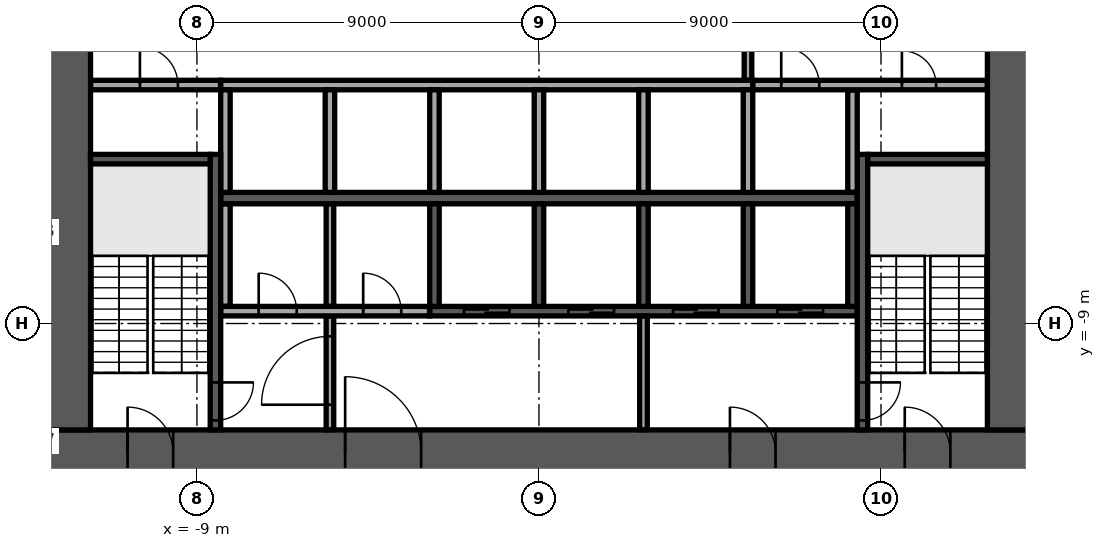
"""IFC4 building model, lengths in metres.
Left out: names, types, materials, properties, quantities, classifications, styles, units other than length and angle.
Written with IfcOpenShell. Run it as: python <this file> out.ifc"""

import sys

from ifc_helpers import new_model, si_unit, direction, frame, frame_2d, origin, place, context, subcontext, project, spatial, rectangle, extrude, element, fill, save


model = new_model("IFC4")
c1 = context("Model", 3, precision=1e-05, world=origin(), true_north=direction((0.0, 1.0)))
c2 = subcontext(c1, "Body", "Model", "MODEL_VIEW")
j1 = project(units=[si_unit("LENGTHUNIT", "METRE"), si_unit("PLANEANGLEUNIT", "RADIAN")], contexts=[c1])
p1 = place(None, origin())
s1 = spatial("IfcSite", under=j1, at=p1, CompositionType="ELEMENT")
p2 = place(p1, origin())
s2 = spatial("IfcBuilding", under=s1, at=p2, CompositionType="ELEMENT")
p3 = place(p2, frame((0.0, 0.0, 59.7)))
s3 = spatial("IfcBuildingStorey", under=s2, at=p3, CompositionType="ELEMENT", Elevation=59.7)
p4 = place(p3, frame((-13.0, -12.4, 0.0), z_axis=(0.0, 0.0, 1.0), x_axis=(1.0, 0.0, 0.0)))
e1 = element("IfcWall", 1, at=p4, inside=s3, PredefinedType="SHEAR", context=c2, shape_type="SweptSolid", body=[
    extrude(rectangle(XDim=26.0, YDim=1.2, at=frame_2d((13.0, 0.0))), origin(), (0.0, 0.0, 1.0), 3.75),
])
p5 = place(p4, frame((7.9, 0.0, 0.0)))
e2 = element("IfcOpeningElement", 2, at=p5, cuts=e1, PredefinedType="OPENING", context=c2, shape_type="SweptSolid", body=[
    extrude(rectangle(XDim=2.0, YDim=2.1, at=frame_2d((1.0, 1.05))), frame((0.0, 0.61, 0.0), z_axis=(0.0, -1.0, 0.0), x_axis=(1.0, 0.0, 0.0)), (0.0, 0.0, 1.0), 1.22),
])
p6 = place(p4, frame((18.025, 0.0, 0.0)))
e3 = element("IfcOpeningElement", 3, at=p6, cuts=e1, PredefinedType="OPENING", context=c2, shape_type="SweptSolid", body=[
    extrude(rectangle(XDim=1.2, YDim=2.1, at=frame_2d((0.6, 1.05))), frame((0.0, 0.61, 0.0), z_axis=(0.0, -1.0, 0.0), x_axis=(1.0, 0.0, 0.0)), (0.0, 0.0, 1.0), 1.22),
])
p7 = place(p4, frame((2.175, 0.0, 0.0)))
e4 = element("IfcOpeningElement", 4, at=p7, cuts=e1, PredefinedType="OPENING", context=c2, shape_type="SweptSolid", body=[
    extrude(rectangle(XDim=1.2, YDim=2.1, at=frame_2d((0.6, 1.05))), frame((0.0, 0.61, 0.0), z_axis=(0.0, -1.0, 0.0), x_axis=(1.0, 0.0, 0.0)), (0.0, 0.0, 1.0), 1.22),
])
p8 = place(p4, frame((22.625, 0.0, 0.0)))
e5 = element("IfcOpeningElement", 5, at=p8, cuts=e1, PredefinedType="OPENING", context=c2, shape_type="SweptSolid", body=[
    extrude(rectangle(XDim=1.2, YDim=2.1, at=frame_2d((0.6, 1.05))), frame((0.0, 0.61, 0.0), z_axis=(0.0, -1.0, 0.0), x_axis=(1.0, 0.0, 0.0)), (0.0, 0.0, 1.0), 1.22),
])
p9 = place(p3, frame((12.4, -11.8, 0.0), z_axis=(0.0, 0.0, 1.0), x_axis=(0.0, 1.0, 0.0)))
e6 = element("IfcWall", 6, at=p9, inside=s3, PredefinedType="SHEAR", context=c2, shape_type="SweptSolid", body=[
    extrude(rectangle(XDim=23.6, YDim=1.2, at=frame_2d((11.8, 0.0))), origin(), (0.0, 0.0, 1.0), 3.75),
])
p10 = place(p9, frame((10.6, 0.0, 0.0)))
e7 = element("IfcOpeningElement", 7, at=p10, cuts=e6, PredefinedType="OPENING", context=c2, shape_type="SweptSolid", body=[
    extrude(rectangle(XDim=2.4, YDim=2.4, at=frame_2d((1.2, 1.2))), frame((0.0, 0.61, 0.0), z_axis=(0.0, -1.0, 0.0), x_axis=(1.0, 0.0, 0.0)), (0.0, 0.0, 1.0), 1.22),
])
p11 = place(p3, frame((-12.4, -11.8, 0.0), z_axis=(0.0, 0.0, 1.0), x_axis=(0.0, 1.0, 0.0)))
e8 = element("IfcWall", 8, at=p11, inside=s3, PredefinedType="SHEAR", context=c2, shape_type="SweptSolid", body=[
    extrude(rectangle(XDim=23.6, YDim=1.2, at=frame_2d((11.8, 0.0))), origin(), (0.0, 0.0, 1.0), 3.75),
])
p12 = place(p11, frame((10.6, 0.0, 0.0)))
e9 = element("IfcOpeningElement", 9, at=p12, cuts=e8, PredefinedType="OPENING", context=c2, shape_type="SweptSolid", body=[
    extrude(rectangle(XDim=2.4, YDim=2.4, at=frame_2d((1.2, 1.2))), frame((0.0, 0.61, 0.0), z_axis=(0.0, -1.0, 0.0), x_axis=(1.0, 0.0, 0.0)), (0.0, 0.0, 1.0), 1.22),
])
p13 = place(p3, frame((-8.375, -5.7, 0.0), z_axis=(0.0, 0.0, 1.0), x_axis=(1.0, 0.0, 0.0)))
e10 = element("IfcWall", 10, at=p13, inside=s3, PredefinedType="SOLIDWALL", context=c2, shape_type="SweptSolid", body=[
    extrude(rectangle(XDim=16.75, YDim=0.3, at=frame_2d((8.375, 0.0))), origin(), (0.0, 0.0, 1.0), 3.75),
])
p14 = place(p3, frame((-8.375, -2.725, 0.0), z_axis=(0.0, 0.0, 1.0), x_axis=(1.0, 0.0, 0.0)))
e11 = element("IfcWall", 11, at=p14, inside=s3, PredefinedType="SOLIDWALL", context=c2, shape_type="SweptSolid", body=[
    extrude(rectangle(XDim=14.0, YDim=0.25, at=frame_2d((7.0, 0.0))), origin(), (0.0, 0.0, 1.0), 3.75),
])
for number, where, z_axis, x_axis in (
    (12, (-8.25, -5.55, 0.0), (0.0, 0.0, 1.0), (0.0, 1.0, 0.0)),
    (13, (-5.5, -5.55, 0.0), (0.0, 0.0, 1.0), (0.0, 1.0, 0.0)),
    (14, (-2.75, -5.55, 0.0), (0.0, 0.0, 1.0), (0.0, 1.0, 0.0)),
    (15, (0.0, -5.55, 0.0), (0.0, 0.0, 1.0), (0.0, 1.0, 0.0)),
    (16, (2.75, -5.55, 0.0), (0.0, 0.0, 1.0), (0.0, 1.0, 0.0)),
    (17, (5.5, -5.55, 0.0), (0.0, 0.0, 1.0), (0.0, 1.0, 0.0)),
):
    element("IfcWall", number, at=place(p3, frame(where, z_axis=z_axis, x_axis=x_axis)), inside=s3, PredefinedType="SOLIDWALL", context=c2, shape_type="SweptSolid", body=[
        extrude(rectangle(XDim=2.7, YDim=0.25, at=frame_2d((1.35, 0.0))), origin(), (0.0, 0.0, 1.0), 3.75),
    ])
p15 = place(p3, frame((-2.875, -8.675, 0.0), z_axis=(0.0, 0.0, 1.0), x_axis=(1.0, 0.0, 0.0)))
e18 = element("IfcWall", 18, at=p15, inside=s3, PredefinedType="SOLIDWALL", context=c2, shape_type="SweptSolid", body=[
    extrude(rectangle(XDim=11.25, YDim=0.25, at=frame_2d((5.625, 0.0))), origin(), (0.0, 0.0, 1.0), 3.75),
])
p16 = place(p15, frame((0.9, 0.0, 0.0)))
e19 = element("IfcOpeningElement", 19, at=p16, cuts=e18, PredefinedType="OPENING", context=c2, shape_type="SweptSolid", body=[
    extrude(rectangle(XDim=1.2, YDim=2.1, at=frame_2d((0.6, 1.05))), frame((0.0, 0.135, 0.0), z_axis=(0.0, -1.0, 0.0), x_axis=(1.0, 0.0, 0.0)), (0.0, 0.0, 1.0), 0.27),
])
p17 = place(p15, frame((3.65, 0.0, 0.0)))
e20 = element("IfcOpeningElement", 20, at=p17, cuts=e18, PredefinedType="OPENING", context=c2, shape_type="SweptSolid", body=[
    extrude(rectangle(XDim=1.2, YDim=2.1, at=frame_2d((0.6, 1.05))), frame((0.0, 0.135, 0.0), z_axis=(0.0, -1.0, 0.0), x_axis=(1.0, 0.0, 0.0)), (0.0, 0.0, 1.0), 0.27),
])
p18 = place(p15, frame((6.4, 0.0, 0.0)))
e21 = element("IfcOpeningElement", 21, at=p18, cuts=e18, PredefinedType="OPENING", context=c2, shape_type="SweptSolid", body=[
    extrude(rectangle(XDim=1.2, YDim=2.1, at=frame_2d((0.6, 1.05))), frame((0.0, 0.135, 0.0), z_axis=(0.0, -1.0, 0.0), x_axis=(1.0, 0.0, 0.0)), (0.0, 0.0, 1.0), 0.27),
])
p19 = place(p15, frame((9.15, 0.0, 0.0)))
e22 = element("IfcOpeningElement", 22, at=p19, cuts=e18, PredefinedType="OPENING", context=c2, shape_type="SweptSolid", body=[
    extrude(rectangle(XDim=1.2, YDim=2.1, at=frame_2d((0.6, 1.05))), frame((0.0, 0.135, 0.0), z_axis=(0.0, -1.0, 0.0), x_axis=(1.0, 0.0, 0.0)), (0.0, 0.0, 1.0), 0.27),
])
for number, where, z_axis, x_axis in (
    (23, (-2.75, -8.55, 0.0), (0.0, 0.0, 1.0), (0.0, 1.0, 0.0)),
    (24, (0.0, -8.55, 0.0), (0.0, 0.0, 1.0), (0.0, 1.0, 0.0)),
    (25, (2.75, -8.55, 0.0), (0.0, 0.0, 1.0), (0.0, 1.0, 0.0)),
    (26, (5.5, -8.55, 0.0), (0.0, 0.0, 1.0), (0.0, 1.0, 0.0)),
    (27, (8.25, -8.55, 0.0), (0.0, 0.0, 1.0), (0.0, 1.0, 0.0)),
):
    element("IfcWall", number, at=place(p3, frame(where, z_axis=z_axis, x_axis=x_axis)), inside=s3, PredefinedType="SOLIDWALL", context=c2, shape_type="SweptSolid", body=[
        extrude(rectangle(XDim=2.7, YDim=0.25, at=frame_2d((1.35, 0.0))), origin(), (0.0, 0.0, 1.0), 3.75),
    ])
p20 = place(p3, frame((-8.512, -4.55, 0.0), z_axis=(0.0, 0.0, 1.0), x_axis=(0.0, -1.0, 0.0)))
e28 = element("IfcWall", 28, at=p20, inside=s3, PredefinedType="SOLIDWALL", context=c2, shape_type="SweptSolid", body=[
    extrude(rectangle(XDim=7.25, YDim=0.275, at=frame_2d((3.625, 0.0))), origin(), (0.0, 0.0, 1.0), 3.75),
])
p21 = place(p20, frame((6.0, 0.0, 0.0)))
e29 = element("IfcOpeningElement", 29, at=p21, cuts=e28, PredefinedType="OPENING", context=c2, shape_type="SweptSolid", body=[
    extrude(rectangle(XDim=1.0, YDim=2.1, at=frame_2d((0.5, 1.05))), frame((0.0, 0.147, 0.0), z_axis=(0.0, -1.0, 0.0), x_axis=(1.0, 0.0, 0.0)), (0.0, 0.0, 1.0), 0.295),
])
p22 = place(p3, frame((-8.65, -4.675, 0.0), z_axis=(0.0, 0.0, 1.0), x_axis=(-1.0, 0.0, 0.0)))
e30 = element("IfcWall", 30, at=p22, inside=s3, PredefinedType="SOLIDWALL", context=c2, shape_type="SweptSolid", body=[
    extrude(rectangle(XDim=3.15, YDim=0.25, at=frame_2d((1.575, 0.0))), origin(), (0.0, 0.0, 1.0), 3.75),
])
p23 = place(p3, frame((8.512, -4.55, 0.0), z_axis=(0.0, 0.0, 1.0), x_axis=(0.0, -1.0, 0.0)))
e31 = element("IfcWall", 31, at=p23, inside=s3, PredefinedType="SOLIDWALL", context=c2, shape_type="SweptSolid", body=[
    extrude(rectangle(XDim=7.25, YDim=0.275, at=frame_2d((3.625, 0.0))), origin(), (0.0, 0.0, 1.0), 3.75),
])
p24 = place(p23, frame((6.0, 0.0, 0.0)))
e32 = element("IfcOpeningElement", 32, at=p24, cuts=e31, PredefinedType="OPENING", context=c2, shape_type="SweptSolid", body=[
    extrude(rectangle(XDim=1.0, YDim=2.1, at=frame_2d((0.5, 1.05))), frame((0.0, 0.147, 0.0), z_axis=(0.0, -1.0, 0.0), x_axis=(1.0, 0.0, 0.0)), (0.0, 0.0, 1.0), 0.295),
])
p25 = place(p3, frame((8.65, -4.675, 0.0), z_axis=(0.0, 0.0, 1.0), x_axis=(1.0, 0.0, 0.0)))
e33 = element("IfcWall", 33, at=p25, inside=s3, PredefinedType="SOLIDWALL", context=c2, shape_type="SweptSolid", body=[
    extrude(rectangle(XDim=3.15, YDim=0.25, at=frame_2d((1.575, 0.0))), origin(), (0.0, 0.0, 1.0), 3.75),
])
p26 = place(p3, frame((-5.5, -11.795, 0.0), z_axis=(0.0, 0.0, 1.0), x_axis=(0.0, 1.0, 0.0)))
e34 = element("IfcWall", 34, at=p26, inside=s3, PredefinedType="PARTITIONING", context=c2, shape_type="SweptSolid", body=[
    extrude(rectangle(XDim=2.99, YDim=0.2, at=frame_2d((1.495, 0.0))), origin(), (0.0, 0.0, 1.0), 3.75),
])
p27 = place(p26, frame((0.657, 0.0, 0.0)))
e35 = element("IfcOpeningElement", 35, at=p27, cuts=e34, PredefinedType="OPENING", context=c2, shape_type="SweptSolid", body=[
    extrude(rectangle(XDim=1.8, YDim=2.1, at=frame_2d((0.9, 1.05))), frame((0.0, 0.11, 0.0), z_axis=(0.0, -1.0, 0.0), x_axis=(1.0, 0.0, 0.0)), (0.0, 0.0, 1.0), 0.22),
])
p28 = place(p3, frame((2.75, -11.795, 0.0), z_axis=(0.0, 0.0, 1.0), x_axis=(0.0, 1.0, 0.0)))
e36 = element("IfcWall", 36, at=p28, inside=s3, PredefinedType="PARTITIONING", context=c2, shape_type="SweptSolid", body=[
    extrude(rectangle(XDim=2.99, YDim=0.2, at=frame_2d((1.495, 0.0))), origin(), (0.0, 0.0, 1.0), 3.75),
])
p29 = place(p3, frame((-8.37, -8.675, 0.0), z_axis=(0.0, 0.0, 1.0), x_axis=(1.0, 0.0, 0.0)))
e37 = element("IfcWall", 37, at=p29, inside=s3, PredefinedType="PARTITIONING", context=c2, shape_type="SweptSolid", body=[
    extrude(rectangle(XDim=5.49, YDim=0.25, at=frame_2d((2.745, 0.0))), origin(), (0.0, 0.0, 1.0), 3.75),
])
p30 = place(p29, frame((0.995, 0.0, 0.0)))
e38 = element("IfcOpeningElement", 38, at=p30, cuts=e37, PredefinedType="OPENING", context=c2, shape_type="SweptSolid", body=[
    extrude(rectangle(XDim=1.0, YDim=2.1, at=frame_2d((0.5, 1.05))), frame((0.0, 0.135, 0.0), z_axis=(0.0, -1.0, 0.0), x_axis=(1.0, 0.0, 0.0)), (0.0, 0.0, 1.0), 0.27),
])
p31 = place(p29, frame((3.745, 0.0, 0.0)))
e39 = element("IfcOpeningElement", 39, at=p31, cuts=e37, PredefinedType="OPENING", context=c2, shape_type="SweptSolid", body=[
    extrude(rectangle(XDim=1.0, YDim=2.1, at=frame_2d((0.5, 1.05))), frame((0.0, 0.135, 0.0), z_axis=(0.0, -1.0, 0.0), x_axis=(1.0, 0.0, 0.0)), (0.0, 0.0, 1.0), 0.27),
])
p32 = place(p3, frame((-8.25, -8.545, 0.0), z_axis=(0.0, 0.0, 1.0), x_axis=(0.0, 1.0, 0.0)))
e40 = element("IfcWall", 40, at=p32, inside=s3, PredefinedType="PARTITIONING", context=c2, shape_type="SweptSolid", body=[
    extrude(rectangle(XDim=2.69, YDim=0.25, at=frame_2d((1.345, 0.0))), origin(), (0.0, 0.0, 1.0), 3.75),
])
p33 = place(p3, frame((-5.5, -8.545, 0.0), z_axis=(0.0, 0.0, 1.0), x_axis=(0.0, 1.0, 0.0)))
e41 = element("IfcWall", 41, at=p33, inside=s3, PredefinedType="PARTITIONING", context=c2, shape_type="SweptSolid", body=[
    extrude(rectangle(XDim=2.69, YDim=0.2, at=frame_2d((1.345, 0.0))), origin(), (0.0, 0.0, 1.0), 3.75),
])
p34 = place(p3, frame((8.25, -5.545, 0.0), z_axis=(0.0, 0.0, 1.0), x_axis=(0.0, 1.0, 0.0)))
e42 = element("IfcWall", 42, at=p34, inside=s3, PredefinedType="PARTITIONING", context=c2, shape_type="SweptSolid", body=[
    extrude(rectangle(XDim=2.69, YDim=0.25, at=frame_2d((1.345, 0.0))), origin(), (0.0, 0.0, 1.0), 3.75),
])
p35 = place(p3, frame((-11.795, -2.725, 0.0), z_axis=(0.0, 0.0, 1.0), x_axis=(1.0, 0.0, 0.0)))
e43 = element("IfcWall", 43, at=p35, inside=s3, PredefinedType="PARTITIONING", context=c2, shape_type="SweptSolid", body=[
    extrude(rectangle(XDim=3.415, YDim=0.25, at=frame_2d((1.708, 0.0))), origin(), (0.0, 0.0, 1.0), 3.75),
])
p36 = place(p35, frame((1.295, 0.0, 0.0)))
e44 = element("IfcOpeningElement", 44, at=p36, cuts=e43, PredefinedType="OPENING", context=c2, shape_type="SweptSolid", body=[
    extrude(rectangle(XDim=1.0, YDim=2.1, at=frame_2d((0.5, 1.05))), frame((0.0, 0.135, 0.0), z_axis=(0.0, -1.0, 0.0), x_axis=(1.0, 0.0, 0.0)), (0.0, 0.0, 1.0), 0.27),
])
p37 = place(p3, frame((5.63, -2.725, 0.0), z_axis=(0.0, 0.0, 1.0), x_axis=(1.0, 0.0, 0.0)))
e45 = element("IfcWall", 45, at=p37, inside=s3, PredefinedType="PARTITIONING", context=c2, shape_type="SweptSolid", body=[
    extrude(rectangle(XDim=6.165, YDim=0.25, at=frame_2d((3.083, 0.0))), origin(), (0.0, 0.0, 1.0), 3.75),
])
p38 = place(p37, frame((0.745, 0.0, 0.0)))
e46 = element("IfcOpeningElement", 46, at=p38, cuts=e45, PredefinedType="OPENING", context=c2, shape_type="SweptSolid", body=[
    extrude(rectangle(XDim=1.0, YDim=2.1, at=frame_2d((0.5, 1.05))), frame((0.0, 0.135, 0.0), z_axis=(0.0, -1.0, 0.0), x_axis=(1.0, 0.0, 0.0)), (0.0, 0.0, 1.0), 0.27),
])
p39 = place(p37, frame((3.92, 0.0, 0.0)))
e47 = element("IfcOpeningElement", 47, at=p39, cuts=e45, PredefinedType="OPENING", context=c2, shape_type="SweptSolid", body=[
    extrude(rectangle(XDim=0.9, YDim=2.1, at=frame_2d((0.45, 1.05))), frame((0.0, 0.135, 0.0), z_axis=(0.0, -1.0, 0.0), x_axis=(1.0, 0.0, 0.0)), (0.0, 0.0, 1.0), 0.27),
])
p40 = place(p3, frame((5.5, -2.595, 0.0), z_axis=(0.0, 0.0, 1.0), x_axis=(0.0, 1.0, 0.0)))
e48 = element("IfcWall", 48, at=p40, inside=s3, PredefinedType="PARTITIONING", context=c2, shape_type="SweptSolid", body=[
    extrude(rectangle(XDim=5.19, YDim=0.2, at=frame_2d((2.595, 0.0))), origin(), (0.0, 0.0, 1.0), 3.75),
])
p41 = place(p40, frame((1.395, 0.0, 0.0)))
e49 = element("IfcOpeningElement", 49, at=p41, cuts=e48, PredefinedType="OPENING", context=c2, shape_type="SweptSolid", body=[
    extrude(rectangle(XDim=2.4, YDim=2.4, at=frame_2d((1.2, 1.2))), frame((0.0, 0.11, 0.0), z_axis=(0.0, -1.0, 0.0), x_axis=(1.0, 0.0, 0.0)), (0.0, 0.0, 1.0), 0.22),
])
p42 = place(p5, origin())
e50 = element("IfcDoor", 50, at=p42, inside=s3, OperationType="SINGLE_SWING_LEFT", PredefinedType="DOOR", context=c2, shape_type="SweptSolid", body=[
    extrude(rectangle(XDim=2.0, YDim=2.1, at=frame_2d((1.0, 1.05))), frame((0.0, 0.025, 0.0), z_axis=(0.0, -1.0, 0.0), x_axis=(1.0, 0.0, 0.0)), (0.0, 0.0, 1.0), 0.05),
])
fill(e2, e50)
p43 = place(p6, origin())
e51 = element("IfcDoor", 51, at=p43, inside=s3, OperationType="SINGLE_SWING_LEFT", PredefinedType="DOOR", context=c2, shape_type="SweptSolid", body=[
    extrude(rectangle(XDim=1.2, YDim=2.1, at=frame_2d((0.6, 1.05))), frame((0.0, 0.025, 0.0), z_axis=(0.0, -1.0, 0.0), x_axis=(1.0, 0.0, 0.0)), (0.0, 0.0, 1.0), 0.05),
])
fill(e3, e51)
p44 = place(p7, origin())
e52 = element("IfcDoor", 52, at=p44, inside=s3, OperationType="SINGLE_SWING_LEFT", PredefinedType="DOOR", context=c2, shape_type="SweptSolid", body=[
    extrude(rectangle(XDim=1.2, YDim=2.1, at=frame_2d((0.6, 1.05))), frame((0.0, 0.025, 0.0), z_axis=(0.0, -1.0, 0.0), x_axis=(1.0, 0.0, 0.0)), (0.0, 0.0, 1.0), 0.05),
])
fill(e4, e52)
p45 = place(p8, origin())
e53 = element("IfcDoor", 53, at=p45, inside=s3, OperationType="SINGLE_SWING_LEFT", PredefinedType="DOOR", context=c2, shape_type="SweptSolid", body=[
    extrude(rectangle(XDim=1.2, YDim=2.1, at=frame_2d((0.6, 1.05))), frame((0.0, 0.025, 0.0), z_axis=(0.0, -1.0, 0.0), x_axis=(1.0, 0.0, 0.0)), (0.0, 0.0, 1.0), 0.05),
])
fill(e5, e53)
p46 = place(p16, origin())
e54 = element("IfcDoor", 54, at=p46, inside=s3, OperationType="DOUBLE_DOOR_SLIDING", PredefinedType="DOOR", context=c2, shape_type="SweptSolid", body=[
    extrude(rectangle(XDim=1.2, YDim=2.1, at=frame_2d((0.6, 1.05))), frame((0.0, 0.025, 0.0), z_axis=(0.0, -1.0, 0.0), x_axis=(1.0, 0.0, 0.0)), (0.0, 0.0, 1.0), 0.05),
])
fill(e19, e54)
p47 = place(p17, origin())
e55 = element("IfcDoor", 55, at=p47, inside=s3, OperationType="DOUBLE_DOOR_SLIDING", PredefinedType="DOOR", context=c2, shape_type="SweptSolid", body=[
    extrude(rectangle(XDim=1.2, YDim=2.1, at=frame_2d((0.6, 1.05))), frame((0.0, 0.025, 0.0), z_axis=(0.0, -1.0, 0.0), x_axis=(1.0, 0.0, 0.0)), (0.0, 0.0, 1.0), 0.05),
])
fill(e20, e55)
p48 = place(p18, origin())
e56 = element("IfcDoor", 56, at=p48, inside=s3, OperationType="DOUBLE_DOOR_SLIDING", PredefinedType="DOOR", context=c2, shape_type="SweptSolid", body=[
    extrude(rectangle(XDim=1.2, YDim=2.1, at=frame_2d((0.6, 1.05))), frame((0.0, 0.025, 0.0), z_axis=(0.0, -1.0, 0.0), x_axis=(1.0, 0.0, 0.0)), (0.0, 0.0, 1.0), 0.05),
])
fill(e21, e56)
p49 = place(p19, origin())
e57 = element("IfcDoor", 57, at=p49, inside=s3, OperationType="DOUBLE_DOOR_SLIDING", PredefinedType="DOOR", context=c2, shape_type="SweptSolid", body=[
    extrude(rectangle(XDim=1.2, YDim=2.1, at=frame_2d((0.6, 1.05))), frame((0.0, 0.025, 0.0), z_axis=(0.0, -1.0, 0.0), x_axis=(1.0, 0.0, 0.0)), (0.0, 0.0, 1.0), 0.05),
])
fill(e22, e57)
p50 = place(p21, origin())
e58 = element("IfcDoor", 58, at=p50, inside=s3, OperationType="SINGLE_SWING_LEFT", PredefinedType="DOOR", context=c2, shape_type="SweptSolid", body=[
    extrude(rectangle(XDim=1.0, YDim=2.1, at=frame_2d((0.5, 1.05))), frame((0.0, 0.025, 0.0), z_axis=(0.0, -1.0, 0.0), x_axis=(1.0, 0.0, 0.0)), (0.0, 0.0, 1.0), 0.05),
])
fill(e29, e58)
p51 = place(p24, origin())
e59 = element("IfcDoor", 59, at=p51, inside=s3, OperationType="SINGLE_SWING_LEFT", PredefinedType="DOOR", context=c2, shape_type="SweptSolid", body=[
    extrude(rectangle(XDim=1.0, YDim=2.1, at=frame_2d((0.5, 1.05))), frame((0.0, 0.025, 0.0), z_axis=(0.0, -1.0, 0.0), x_axis=(1.0, 0.0, 0.0)), (0.0, 0.0, 1.0), 0.05),
])
fill(e32, e59)
p52 = place(p30, origin())
e60 = element("IfcDoor", 60, at=p52, inside=s3, OperationType="SINGLE_SWING_RIGHT", PredefinedType="DOOR", context=c2, shape_type="SweptSolid", body=[
    extrude(rectangle(XDim=1.0, YDim=2.1, at=frame_2d((0.5, 1.05))), frame((0.0, 0.025, 0.0), z_axis=(0.0, -1.0, 0.0), x_axis=(1.0, 0.0, 0.0)), (0.0, 0.0, 1.0), 0.05),
])
fill(e38, e60)
p53 = place(p31, origin())
e61 = element("IfcDoor", 61, at=p53, inside=s3, OperationType="SINGLE_SWING_RIGHT", PredefinedType="DOOR", context=c2, shape_type="SweptSolid", body=[
    extrude(rectangle(XDim=1.0, YDim=2.1, at=frame_2d((0.5, 1.05))), frame((0.0, 0.025, 0.0), z_axis=(0.0, -1.0, 0.0), x_axis=(1.0, 0.0, 0.0)), (0.0, 0.0, 1.0), 0.05),
])
fill(e39, e61)
p54 = place(p36, origin())
e62 = element("IfcDoor", 62, at=p54, inside=s3, OperationType="SINGLE_SWING_RIGHT", PredefinedType="DOOR", context=c2, shape_type="SweptSolid", body=[
    extrude(rectangle(XDim=1.0, YDim=2.1, at=frame_2d((0.5, 1.05))), frame((0.0, 0.025, 0.0), z_axis=(0.0, -1.0, 0.0), x_axis=(1.0, 0.0, 0.0)), (0.0, 0.0, 1.0), 0.05),
])
fill(e44, e62)
p55 = place(p38, origin())
e63 = element("IfcDoor", 63, at=p55, inside=s3, OperationType="SINGLE_SWING_RIGHT", PredefinedType="DOOR", context=c2, shape_type="SweptSolid", body=[
    extrude(rectangle(XDim=1.0, YDim=2.1, at=frame_2d((0.5, 1.05))), frame((0.0, 0.025, 0.0), z_axis=(0.0, -1.0, 0.0), x_axis=(1.0, 0.0, 0.0)), (0.0, 0.0, 1.0), 0.05),
])
fill(e46, e63)
p56 = place(p39, origin())
e64 = element("IfcDoor", 64, at=p56, inside=s3, OperationType="SINGLE_SWING_RIGHT", PredefinedType="DOOR", context=c2, shape_type="SweptSolid", body=[
    extrude(rectangle(XDim=0.9, YDim=2.1, at=frame_2d((0.45, 1.05))), frame((0.0, 0.025, 0.0), z_axis=(0.0, -1.0, 0.0), x_axis=(1.0, 0.0, 0.0)), (0.0, 0.0, 1.0), 0.05),
])
fill(e47, e64)
p57 = place(p27, origin())
e65 = element("IfcDoor", 65, at=p57, inside=s3, OperationType="SINGLE_SWING_LEFT", PredefinedType="DOOR", context=c2, shape_type="SweptSolid", body=[
    extrude(rectangle(XDim=1.8, YDim=2.1, at=frame_2d((0.9, 1.05))), frame((0.0, 0.025, 0.0), z_axis=(0.0, -1.0, 0.0), x_axis=(1.0, 0.0, 0.0)), (0.0, 0.0, 1.0), 0.05),
])
fill(e35, e65)
save(model, sys.argv[1])
